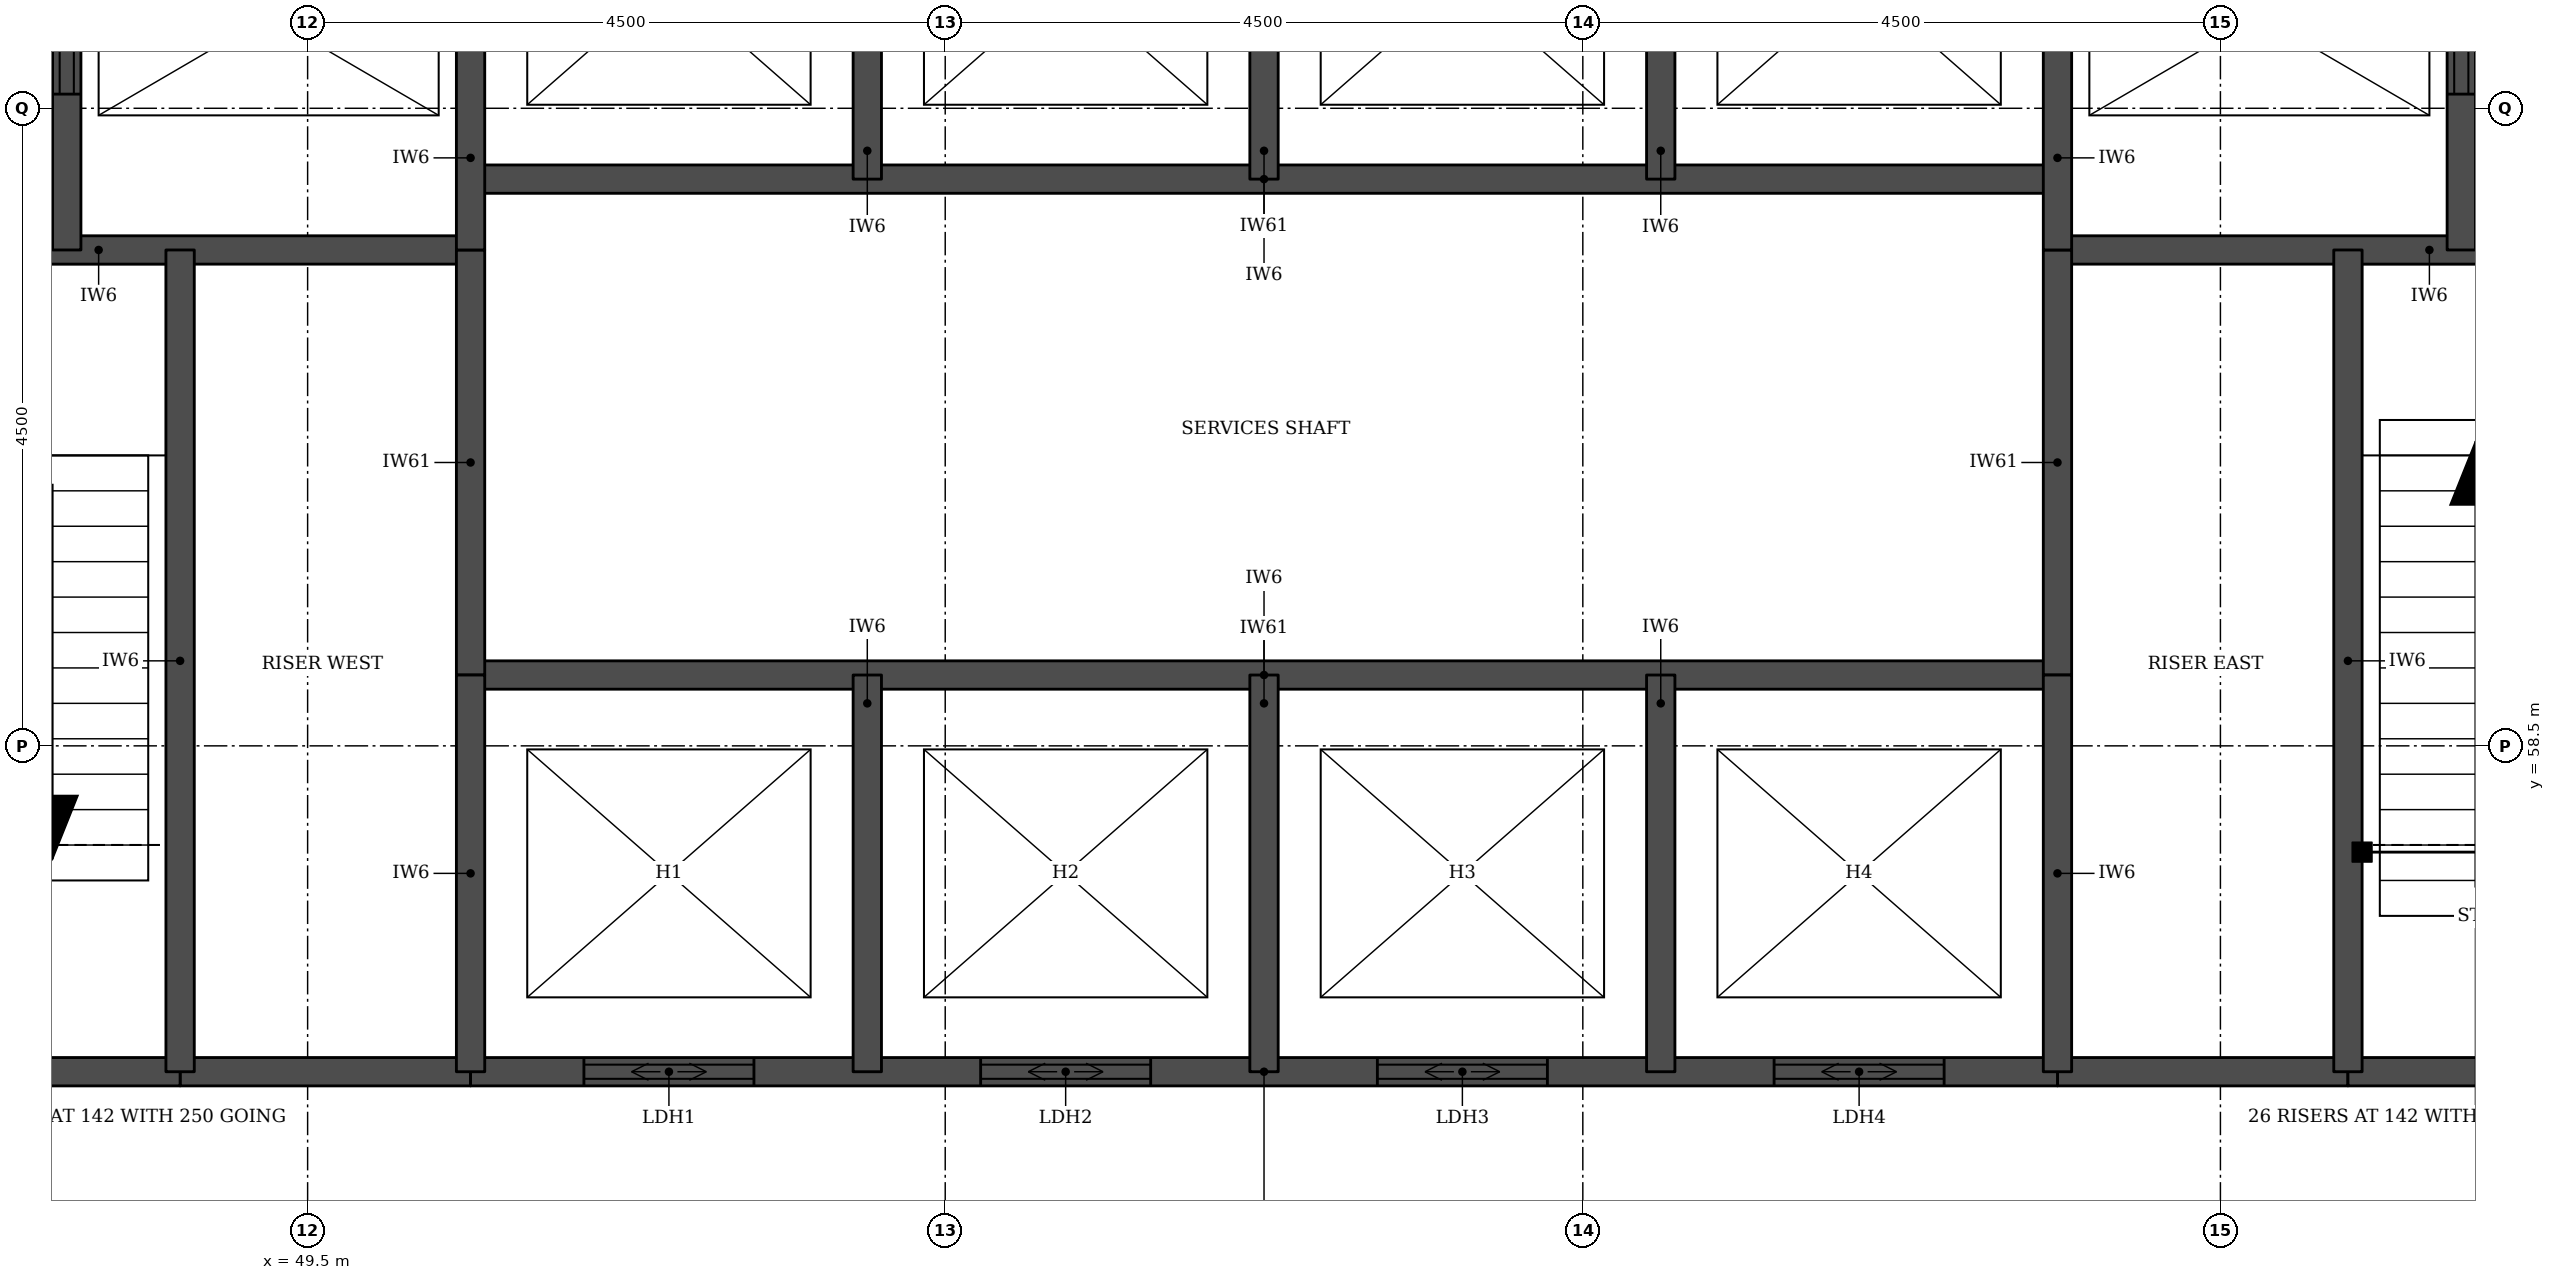
"""IFC4 building model, lengths in metres.
Left out: names, types, materials, properties, quantities, classifications, styles, units other than length and angle.
Written with IfcOpenShell. Run it as: python <this file> out.ifc"""

import sys

from ifc_helpers import new_model, si_unit, direction, frame, frame_2d, origin, place, context, subcontext, project, spatial, rectangle, extrude, element, fill, save


model = new_model("IFC4")
c1 = context("Model", 3, precision=1e-05, world=origin(), true_north=direction((0.0, 1.0)))
c2 = subcontext(c1, "Body", "Model", "MODEL_VIEW")
j1 = project(units=[si_unit("LENGTHUNIT", "METRE"), si_unit("PLANEANGLEUNIT", "RADIAN")], contexts=[c1])
p1 = place(None, origin())
s1 = spatial("IfcSite", under=j1, at=p1, CompositionType="ELEMENT")
p2 = place(p1, origin())
s2 = spatial("IfcBuilding", under=s1, at=p2, CompositionType="ELEMENT")
p3 = place(p2, frame((0.0, 0.0, 155.1)))
s3 = spatial("IfcBuildingStorey", under=s2, at=p3, CompositionType="ELEMENT", Elevation=155.1)
for number, where, z_axis, x_axis in (
    (1, (48.6, 56.2, 0.0), (0.0, 0.0, 1.0), (1.0, 0.0, 0.0)),
    (2, (61.85, 56.2, 0.0), (0.0, 0.0, 1.0), (1.0, 0.0, 0.0)),
):
    element("IfcWall", number, at=place(p3, frame(where, z_axis=z_axis, x_axis=x_axis)), inside=s3, PredefinedType="SOLIDWALL", context=c2, shape_type="SweptSolid", body=[
        extrude(rectangle(XDim=2.05, YDim=0.2, at=frame_2d((1.025, 0.0))), origin(), (0.0, 0.0, 1.0), 3.55),
    ])
p4 = place(p3, frame((45.4, 56.2, 0.0), z_axis=(0.0, 0.0, 1.0), x_axis=(1.0, 0.0, 0.0)))
e3 = element("IfcWall", 3, at=p4, inside=s3, PredefinedType="SOLIDWALL", context=c2, shape_type="SweptSolid", body=[
    extrude(rectangle(XDim=3.2, YDim=0.2, at=frame_2d((1.6, 0.0))), origin(), (0.0, 0.0, 1.0), 3.55),
])
p5 = place(p3, frame((50.65, 56.2, 0.0), z_axis=(0.0, 0.0, 1.0), x_axis=(1.0, 0.0, 0.0)))
e4 = element("IfcWall", 4, at=p5, inside=s3, PredefinedType="SOLIDWALL", context=c2, shape_type="SweptSolid", body=[
    extrude(rectangle(XDim=11.2, YDim=0.2, at=frame_2d((5.6, 0.0))), origin(), (0.0, 0.0, 1.0), 3.55),
])
p6 = place(p5, frame((0.8, 0.0, 0.0)))
e5 = element("IfcOpeningElement", 5, at=p6, cuts=e4, PredefinedType="OPENING", context=c2, shape_type="SweptSolid", body=[
    extrude(rectangle(XDim=1.2, YDim=2.1, at=frame_2d((0.6, 1.05))), frame((0.0, 0.11, 0.0), z_axis=(0.0, -1.0, 0.0), x_axis=(1.0, 0.0, 0.0)), (0.0, 0.0, 1.0), 0.22),
])
p7 = place(p5, frame((3.6, 0.0, 0.0)))
e6 = element("IfcOpeningElement", 6, at=p7, cuts=e4, PredefinedType="OPENING", context=c2, shape_type="SweptSolid", body=[
    extrude(rectangle(XDim=1.2, YDim=2.1, at=frame_2d((0.6, 1.05))), frame((0.0, 0.11, 0.0), z_axis=(0.0, -1.0, 0.0), x_axis=(1.0, 0.0, 0.0)), (0.0, 0.0, 1.0), 0.22),
])
p8 = place(p5, frame((6.4, 0.0, 0.0)))
e7 = element("IfcOpeningElement", 7, at=p8, cuts=e4, PredefinedType="OPENING", context=c2, shape_type="SweptSolid", body=[
    extrude(rectangle(XDim=1.2, YDim=2.1, at=frame_2d((0.6, 1.05))), frame((0.0, 0.11, 0.0), z_axis=(0.0, -1.0, 0.0), x_axis=(1.0, 0.0, 0.0)), (0.0, 0.0, 1.0), 0.22),
])
p9 = place(p5, frame((9.2, 0.0, 0.0)))
e8 = element("IfcOpeningElement", 8, at=p9, cuts=e4, PredefinedType="OPENING", context=c2, shape_type="SweptSolid", body=[
    extrude(rectangle(XDim=1.2, YDim=2.1, at=frame_2d((0.6, 1.05))), frame((0.0, 0.11, 0.0), z_axis=(0.0, -1.0, 0.0), x_axis=(1.0, 0.0, 0.0)), (0.0, 0.0, 1.0), 0.22),
])
p10 = place(p3, frame((63.9, 56.2, 0.0), z_axis=(0.0, 0.0, 1.0), x_axis=(1.0, 0.0, 0.0)))
e9 = element("IfcWall", 9, at=p10, inside=s3, PredefinedType="SOLIDWALL", context=c2, shape_type="SweptSolid", body=[
    extrude(rectangle(XDim=3.2, YDim=0.2, at=frame_2d((1.6, 0.0))), origin(), (0.0, 0.0, 1.0), 3.55),
])
p11 = place(p3, frame((50.65, 59.0, 0.0), z_axis=(0.0, 0.0, 1.0), x_axis=(1.0, 0.0, 0.0)))
e10 = element("IfcWall", 10, at=p11, inside=s3, PredefinedType="SOLIDWALL", context=c2, shape_type="SweptSolid", body=[
    extrude(rectangle(XDim=11.2, YDim=0.2, at=frame_2d((5.6, 0.0))), origin(), (0.0, 0.0, 1.0), 3.7),
])
for number, where, z_axis, x_axis in (
    (11, (45.4, 62.0, 0.0), (0.0, 0.0, 1.0), (1.0, 0.0, 0.0)),
    (12, (61.85, 62.0, 0.0), (0.0, 0.0, 1.0), (1.0, 0.0, 0.0)),
):
    element("IfcWall", number, at=place(p3, frame(where, z_axis=z_axis, x_axis=x_axis)), inside=s3, PredefinedType="SOLIDWALL", context=c2, shape_type="SweptSolid", body=[
        extrude(rectangle(XDim=5.25, YDim=0.2, at=frame_2d((2.625, 0.0))), origin(), (0.0, 0.0, 1.0), 3.55),
    ])
p12 = place(p3, frame((50.65, 62.5, 0.0), z_axis=(0.0, 0.0, 1.0), x_axis=(1.0, 0.0, 0.0)))
e13 = element("IfcWall", 13, at=p12, inside=s3, PredefinedType="SOLIDWALL", context=c2, shape_type="SweptSolid", body=[
    extrude(rectangle(XDim=11.2, YDim=0.2, at=frame_2d((5.6, 0.0))), origin(), (0.0, 0.0, 1.0), 3.7),
])
p13 = place(p3, frame((47.8, 62.0, 0.0), z_axis=(0.0, 0.0, 1.0), x_axis=(0.0, 1.0, 0.0)))
e14 = element("IfcWall", 14, at=p13, inside=s3, PredefinedType="SOLIDWALL", context=c2, shape_type="SweptSolid", body=[
    extrude(rectangle(XDim=3.3, YDim=0.2, at=frame_2d((1.65, 0.0))), origin(), (0.0, 0.0, 1.0), 3.55),
])
p14 = place(p13, frame((1.1, 0.0, 0.0)))
e15 = element("IfcOpeningElement", 15, at=p14, cuts=e14, PredefinedType="OPENING", context=c2, shape_type="SweptSolid", body=[
    extrude(rectangle(XDim=1.1, YDim=2.1, at=frame_2d((0.55, 1.05))), frame((0.0, 0.11, 0.0), z_axis=(0.0, -1.0, 0.0), x_axis=(1.0, 0.0, 0.0)), (0.0, 0.0, 1.0), 0.22),
])
p15 = place(p3, frame((48.6, 56.2, 0.0), z_axis=(0.0, 0.0, 1.0), x_axis=(0.0, 1.0, 0.0)))
e16 = element("IfcWall", 16, at=p15, inside=s3, PredefinedType="SOLIDWALL", context=c2, shape_type="SweptSolid", body=[
    extrude(rectangle(XDim=5.8, YDim=0.2, at=frame_2d((2.9, 0.0))), origin(), (0.0, 0.0, 1.0), 3.55),
])
p16 = place(p3, frame((50.65, 59.0, 0.0), z_axis=(0.0, 0.0, 1.0), x_axis=(0.0, 1.0, 0.0)))
e17 = element("IfcWall", 17, at=p16, inside=s3, PredefinedType="SOLIDWALL", context=c2, shape_type="SweptSolid", body=[
    extrude(rectangle(XDim=3.0, YDim=0.2, at=frame_2d((1.5, 0.0))), origin(), (0.0, 0.0, 1.0), 3.7),
])
p17 = place(p3, frame((50.65, 56.2, 0.0), z_axis=(0.0, 0.0, 1.0), x_axis=(0.0, 1.0, 0.0)))
e18 = element("IfcWall", 18, at=p17, inside=s3, PredefinedType="SOLIDWALL", context=c2, shape_type="SweptSolid", body=[
    extrude(rectangle(XDim=2.8, YDim=0.2, at=frame_2d((1.4, 0.0))), origin(), (0.0, 0.0, 1.0), 3.55),
])
p18 = place(p3, frame((50.65, 62.0, 0.0), z_axis=(0.0, 0.0, 1.0), x_axis=(0.0, 1.0, 0.0)))
e19 = element("IfcWall", 19, at=p18, inside=s3, PredefinedType="SOLIDWALL", context=c2, shape_type="SweptSolid", body=[
    extrude(rectangle(XDim=3.3, YDim=0.2, at=frame_2d((1.65, 0.0))), origin(), (0.0, 0.0, 1.0), 3.55),
])
for number, where, z_axis, x_axis in (
    (20, (53.45, 56.2, 0.0), (0.0, 0.0, 1.0), (0.0, 1.0, 0.0)),
    (21, (53.45, 62.5, 0.0), (0.0, 0.0, 1.0), (0.0, 1.0, 0.0)),
    (22, (56.25, 56.2, 0.0), (0.0, 0.0, 1.0), (0.0, 1.0, 0.0)),
    (23, (56.25, 62.5, 0.0), (0.0, 0.0, 1.0), (0.0, 1.0, 0.0)),
    (24, (59.05, 56.2, 0.0), (0.0, 0.0, 1.0), (0.0, 1.0, 0.0)),
    (25, (59.05, 62.5, 0.0), (0.0, 0.0, 1.0), (0.0, 1.0, 0.0)),
):
    element("IfcWall", number, at=place(p3, frame(where, z_axis=z_axis, x_axis=x_axis)), inside=s3, PredefinedType="SOLIDWALL", context=c2, shape_type="SweptSolid", body=[
        extrude(rectangle(XDim=2.8, YDim=0.2, at=frame_2d((1.4, 0.0))), origin(), (0.0, 0.0, 1.0), 3.55),
    ])
p19 = place(p3, frame((61.85, 59.0, 0.0), z_axis=(0.0, 0.0, 1.0), x_axis=(0.0, 1.0, 0.0)))
e26 = element("IfcWall", 26, at=p19, inside=s3, PredefinedType="SOLIDWALL", context=c2, shape_type="SweptSolid", body=[
    extrude(rectangle(XDim=3.0, YDim=0.2, at=frame_2d((1.5, 0.0))), origin(), (0.0, 0.0, 1.0), 3.7),
])
p20 = place(p3, frame((61.85, 56.2, 0.0), z_axis=(0.0, 0.0, 1.0), x_axis=(0.0, 1.0, 0.0)))
e27 = element("IfcWall", 27, at=p20, inside=s3, PredefinedType="SOLIDWALL", context=c2, shape_type="SweptSolid", body=[
    extrude(rectangle(XDim=2.8, YDim=0.2, at=frame_2d((1.4, 0.0))), origin(), (0.0, 0.0, 1.0), 3.55),
])
p21 = place(p3, frame((61.85, 62.0, 0.0), z_axis=(0.0, 0.0, 1.0), x_axis=(0.0, 1.0, 0.0)))
e28 = element("IfcWall", 28, at=p21, inside=s3, PredefinedType="SOLIDWALL", context=c2, shape_type="SweptSolid", body=[
    extrude(rectangle(XDim=3.3, YDim=0.2, at=frame_2d((1.65, 0.0))), origin(), (0.0, 0.0, 1.0), 3.55),
])
p22 = place(p3, frame((63.9, 56.2, 0.0), z_axis=(0.0, 0.0, 1.0), x_axis=(0.0, 1.0, 0.0)))
e29 = element("IfcWall", 29, at=p22, inside=s3, PredefinedType="SOLIDWALL", context=c2, shape_type="SweptSolid", body=[
    extrude(rectangle(XDim=5.8, YDim=0.2, at=frame_2d((2.9, 0.0))), origin(), (0.0, 0.0, 1.0), 3.55),
])
p23 = place(p3, frame((64.7, 62.0, 0.0), z_axis=(0.0, 0.0, 1.0), x_axis=(0.0, 1.0, 0.0)))
e30 = element("IfcWall", 30, at=p23, inside=s3, PredefinedType="SOLIDWALL", context=c2, shape_type="SweptSolid", body=[
    extrude(rectangle(XDim=3.3, YDim=0.2, at=frame_2d((1.65, 0.0))), origin(), (0.0, 0.0, 1.0), 3.55),
])
p24 = place(p23, frame((1.1, 0.0, 0.0)))
e31 = element("IfcOpeningElement", 31, at=p24, cuts=e30, PredefinedType="OPENING", context=c2, shape_type="SweptSolid", body=[
    extrude(rectangle(XDim=1.1, YDim=2.1, at=frame_2d((0.55, 1.05))), frame((0.0, 0.11, 0.0), z_axis=(0.0, -1.0, 0.0), x_axis=(1.0, 0.0, 0.0)), (0.0, 0.0, 1.0), 0.22),
])
p25 = place(p6, origin())
e32 = element("IfcDoor", 32, at=p25, inside=s3, OperationType="DOUBLE_DOOR_SLIDING", PredefinedType="DOOR", context=c2, shape_type="SweptSolid", body=[
    extrude(rectangle(XDim=1.2, YDim=2.1, at=frame_2d((0.6, 1.05))), frame((0.0, 0.025, 0.0), z_axis=(0.0, -1.0, 0.0), x_axis=(1.0, 0.0, 0.0)), (0.0, 0.0, 1.0), 0.05),
])
fill(e5, e32)
p26 = place(p7, origin())
e33 = element("IfcDoor", 33, at=p26, inside=s3, OperationType="DOUBLE_DOOR_SLIDING", PredefinedType="DOOR", context=c2, shape_type="SweptSolid", body=[
    extrude(rectangle(XDim=1.2, YDim=2.1, at=frame_2d((0.6, 1.05))), frame((0.0, 0.025, 0.0), z_axis=(0.0, -1.0, 0.0), x_axis=(1.0, 0.0, 0.0)), (0.0, 0.0, 1.0), 0.05),
])
fill(e6, e33)
p27 = place(p8, origin())
e34 = element("IfcDoor", 34, at=p27, inside=s3, OperationType="DOUBLE_DOOR_SLIDING", PredefinedType="DOOR", context=c2, shape_type="SweptSolid", body=[
    extrude(rectangle(XDim=1.2, YDim=2.1, at=frame_2d((0.6, 1.05))), frame((0.0, 0.025, 0.0), z_axis=(0.0, -1.0, 0.0), x_axis=(1.0, 0.0, 0.0)), (0.0, 0.0, 1.0), 0.05),
])
fill(e7, e34)
p28 = place(p9, origin())
e35 = element("IfcDoor", 35, at=p28, inside=s3, OperationType="DOUBLE_DOOR_SLIDING", PredefinedType="DOOR", context=c2, shape_type="SweptSolid", body=[
    extrude(rectangle(XDim=1.2, YDim=2.1, at=frame_2d((0.6, 1.05))), frame((0.0, 0.025, 0.0), z_axis=(0.0, -1.0, 0.0), x_axis=(1.0, 0.0, 0.0)), (0.0, 0.0, 1.0), 0.05),
])
fill(e8, e35)
p29 = place(p14, origin())
e36 = element("IfcDoor", 36, at=p29, inside=s3, OperationType="DOUBLE_DOOR_SLIDING", PredefinedType="DOOR", context=c2, shape_type="SweptSolid", body=[
    extrude(rectangle(XDim=1.1, YDim=2.1, at=frame_2d((0.55, 1.05))), frame((0.0, 0.025, 0.0), z_axis=(0.0, -1.0, 0.0), x_axis=(1.0, 0.0, 0.0)), (0.0, 0.0, 1.0), 0.05),
])
fill(e15, e36)
p30 = place(p24, origin())
e37 = element("IfcDoor", 37, at=p30, inside=s3, OperationType="DOUBLE_DOOR_SLIDING", PredefinedType="DOOR", context=c2, shape_type="SweptSolid", body=[
    extrude(rectangle(XDim=1.1, YDim=2.1, at=frame_2d((0.55, 1.05))), frame((0.0, 0.025, 0.0), z_axis=(0.0, -1.0, 0.0), x_axis=(1.0, 0.0, 0.0)), (0.0, 0.0, 1.0), 0.05),
])
fill(e31, e37)
save(model, sys.argv[1])
